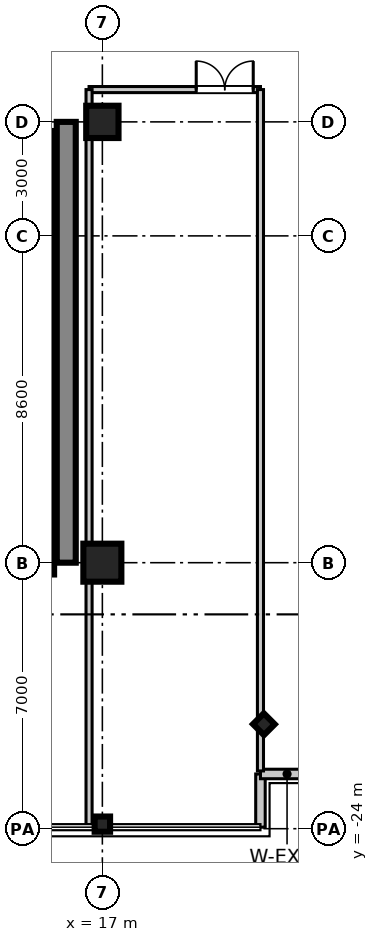
"""IFC4 building model, lengths in metres.
Left out: names, types, materials, properties, quantities, classifications, styles, units other than length and angle.
Written with IfcOpenShell. Run it as: python <this file> out.ifc"""

import sys

from ifc_helpers import new_model, si_unit, direction, frame, frame_2d, origin, origin_2d, place, context, subcontext, project, spatial, rectangle, i_section, extrude, source, transform, mapped, element, fill, save


model = new_model("IFC4")
c1 = context("Model", 3, precision=1e-05, world=origin(), true_north=direction((0.0, 1.0)))
c2 = subcontext(c1, "Body", "Model", "MODEL_VIEW")
j1 = project(units=[si_unit("LENGTHUNIT", "METRE"), si_unit("PLANEANGLEUNIT", "RADIAN")], contexts=[c1])
p1 = place(None, origin())
s1 = spatial("IfcSite", under=j1, at=p1, CompositionType="ELEMENT")
p2 = place(p1, origin())
s2 = spatial("IfcBuilding", under=s1, at=p2, CompositionType="ELEMENT")
p3 = place(p2, frame((0.0, 0.0, 234.5)))
s3 = spatial("IfcBuildingStorey", under=s2, at=p3, CompositionType="ELEMENT", Elevation=234.5)
m1 = source(origin(), c2, "Body", "SweptSolid", [
    extrude(rectangle(XDim=1.0, YDim=1.0, at=origin_2d()), origin(), (0.0, 0.0, 1.0), 3.655),
])
p4 = place(p3, frame((17.0, -17.0, 0.0), z_axis=(0.0, 0.0, 1.0), x_axis=(1.0, 0.0, 0.0)))
e1 = element("IfcColumn", 1, at=p4, inside=s3, PredefinedType="COLUMN", context=c2, shape_type="MappedRepresentation", body=[
    mapped(m1, transform((0.0, 0.0, 0.0), scale=1.0)),
])
m2 = source(origin(), c2, "Body", "SweptSolid", [
    extrude(rectangle(XDim=0.85, YDim=0.85, at=origin_2d()), origin(), (0.0, 0.0, 1.0), 3.655),
])
p5 = place(p3, frame((17.0, -5.4, 0.0), z_axis=(0.0, 0.0, 1.0), x_axis=(1.0, 0.0, 0.0)))
e2 = element("IfcColumn", 2, at=p5, inside=s3, PredefinedType="PILASTER", context=c2, shape_type="MappedRepresentation", body=[
    mapped(m2, transform((0.0, 0.0, 0.0), scale=1.0)),
])
m3 = source(origin(), c2, "Body", "SweptSolid", [
    extrude(i_section(OverallWidth=0.401, OverallDepth=0.406, WebThickness=0.016, FlangeThickness=0.025, at=origin_2d()), origin(), (0.0, 0.0, 1.0), 3.655),
])
for number, where, z_axis, x_axis in (
    (3, (17.0, -23.88, 0.0), (0.0, 0.0, 1.0), (0.0, 1.0, 0.0)),
    (4, (21.25, -21.25, 0.0), (0.0, 0.0, 1.0), (0.707, 0.707, 0.0)),
):
    element("IfcColumn", number, at=place(p3, frame(where, z_axis=z_axis, x_axis=x_axis)), inside=s3, PredefinedType="COLUMN", context=c2, shape_type="MappedRepresentation", body=[
        mapped(m3, transform((0.0, 0.0, 0.0), scale=1.0)),
    ])
m4 = source(origin(), c2, "Body", "SweptSolid", [
    extrude(rectangle(XDim=11.6, YDim=0.5, at=frame_2d((5.8, 0.0))), origin(), (0.0, 0.0, 1.0), 3.41),
])
p6 = place(p3, frame((16.05, -17.0, 0.0), z_axis=(0.0, 0.0, 1.0), x_axis=(0.0, 1.0, 0.0)))
e5 = element("IfcWall", 5, at=p6, inside=s3, PredefinedType="SHEAR", context=c2, shape_type="MappedRepresentation", body=[
    mapped(m4, transform((0.0, 0.0, 0.0), scale=1.0)),
])
m5 = source(origin(), c2, "Body", "SweptSolid", [
    extrude(rectangle(XDim=2.36, YDim=0.22, at=frame_2d((1.18, 0.0))), origin(), (0.0, 0.0, 1.0), 3.41),
])
p7 = place(p3, frame((15.62, -8.0, 0.0), z_axis=(0.0, 0.0, 1.0), x_axis=(0.0, 1.0, 0.0)))
e6 = element("IfcWall", 6, at=p7, inside=s3, PredefinedType="SHEAR", context=c2, shape_type="MappedRepresentation", body=[
    mapped(m5, transform((0.0, 0.0, 0.0), scale=1.0)),
])
m6 = source(origin(), c2, "Body", "SweptSolid", [
    extrude(rectangle(XDim=2.2, YDim=0.22, at=frame_2d((1.1, 0.0))), origin(), (0.0, 0.0, 1.0), 3.41),
])
for number, where, z_axis, x_axis in (
    (7, (15.62, -10.2, 0.0), (0.0, 0.0, 1.0), (0.0, 1.0, 0.0)),
    (8, (15.62, -12.4, 0.0), (0.0, 0.0, 1.0), (0.0, 1.0, 0.0)),
):
    element("IfcWall", number, at=place(p3, frame(where, z_axis=z_axis, x_axis=x_axis)), inside=s3, PredefinedType="SHEAR", context=c2, shape_type="MappedRepresentation", body=[
        mapped(m6, transform((0.0, 0.0, 0.0), scale=1.0)),
    ])
m7 = source(origin(), c2, "Body", "SweptSolid", [
    extrude(rectangle(XDim=2.3, YDim=0.22, at=frame_2d((1.15, 0.0))), origin(), (0.0, 0.0, 1.0), 3.41),
])
p8 = place(p3, frame((15.62, -14.7, 0.0), z_axis=(0.0, 0.0, 1.0), x_axis=(0.0, 1.0, 0.0)))
e9 = element("IfcWall", 9, at=p8, inside=s3, PredefinedType="SHEAR", context=c2, shape_type="MappedRepresentation", body=[
    mapped(m7, transform((0.0, 0.0, 0.0), scale=1.0)),
])
m8 = source(origin(), c2, "Body", "SweptSolid", [
    extrude(rectangle(XDim=2.61, YDim=0.22, at=frame_2d((1.305, 0.0))), origin(), (0.0, 0.0, 1.0), 3.41),
])
p9 = place(p3, frame((15.62, -17.31, 0.0), z_axis=(0.0, 0.0, 1.0), x_axis=(0.0, 1.0, 0.0)))
e10 = element("IfcWall", 10, at=p9, inside=s3, PredefinedType="SHEAR", context=c2, shape_type="MappedRepresentation", body=[
    mapped(m8, transform((0.0, 0.0, 0.0), scale=1.0)),
])
m9 = source(origin(), c2, "Body", "SweptSolid", [
    extrude(rectangle(XDim=1.4, YDim=0.25, at=frame_2d((0.7, 0.0))), origin(), (0.0, 0.0, 1.0), 3.41),
])
p10 = place(p3, frame((21.16, -23.96, 0.0), z_axis=(0.0, 0.0, 1.0), x_axis=(0.0, 1.0, 0.0)))
e11 = element("IfcWall", 11, at=p10, inside=s3, PredefinedType="STANDARD", context=c2, shape_type="MappedRepresentation", body=[
    mapped(m9, transform((0.0, 0.0, 0.0), scale=1.0)),
])
m10 = source(origin(), c2, "Body", "SweptSolid", [
    extrude(rectangle(XDim=1.4, YDim=0.25, at=frame_2d((0.7, 0.0))), origin(), (0.0, 0.0, 1.0), 3.41),
])
p11 = place(p3, frame((21.16, -22.56, 0.0), z_axis=(0.0, 0.0, 1.0), x_axis=(1.0, 0.0, 0.0)))
e12 = element("IfcWall", 12, at=p11, inside=s3, PredefinedType="STANDARD", context=c2, shape_type="MappedRepresentation", body=[
    mapped(m10, transform((0.0, 0.0, 0.0), scale=1.0)),
])
m11 = source(origin(), c2, "Body", "SweptSolid", [
    extrude(rectangle(XDim=4.51, YDim=0.16, at=frame_2d((2.255, 0.0))), origin(), (0.0, 0.0, 1.0), 2.75),
])
p12 = place(p3, frame((16.65, -4.55, 0.0), z_axis=(0.0, 0.0, 1.0), x_axis=(1.0, 0.0, 0.0)))
e13 = element("IfcWall", 13, at=p12, inside=s3, PredefinedType="PARTITIONING", context=c2, shape_type="MappedRepresentation", body=[
    mapped(m11, transform((0.0, 0.0, 0.0), scale=1.0)),
])
p13 = place(p12, frame((2.82, 0.0, 0.0)))
e14 = element("IfcOpeningElement", 14, at=p13, cuts=e13, PredefinedType="OPENING", context=c2, shape_type="SweptSolid", body=[
    extrude(rectangle(XDim=1.5, YDim=2.15, at=frame_2d((0.75, 1.075))), frame((0.0, 0.09, 0.0), z_axis=(0.0, -1.0, 0.0), x_axis=(1.0, 0.0, 0.0)), (0.0, 0.0, 1.0), 0.18),
])
m12 = source(origin(), c2, "Body", "SweptSolid", [
    extrude(rectangle(XDim=19.35, YDim=0.16, at=frame_2d((9.675, 0.0))), origin(), (0.0, 0.0, 1.0), 2.75),
])
p14 = place(p3, frame((16.65, -23.9, 0.0), z_axis=(0.0, 0.0, 1.0), x_axis=(0.0, 1.0, 0.0)))
e15 = element("IfcWall", 15, at=p14, inside=s3, PredefinedType="PARTITIONING", context=c2, shape_type="MappedRepresentation", body=[
    mapped(m12, transform((0.0, 0.0, 0.0), scale=1.0)),
])
m13 = source(origin(), c2, "Body", "SweptSolid", [
    extrude(rectangle(XDim=17.93, YDim=0.16, at=frame_2d((8.965, 0.0))), origin(), (0.0, 0.0, 1.0), 2.75),
])
p15 = place(p3, frame((21.16, -22.48, 0.0), z_axis=(0.0, 0.0, 1.0), x_axis=(0.0, 1.0, 0.0)))
e16 = element("IfcWall", 16, at=p15, inside=s3, PredefinedType="PARTITIONING", context=c2, shape_type="MappedRepresentation", body=[
    mapped(m13, transform((0.0, 0.0, 0.0), scale=1.0)),
])
m14 = source(origin(), c2, "Body", "SweptSolid", [
    extrude(rectangle(XDim=1.5, YDim=2.15, at=frame_2d((0.75, 1.075))), frame((0.0, 0.025, 0.0), z_axis=(0.0, -1.0, 0.0), x_axis=(1.0, 0.0, 0.0)), (0.0, 0.0, 1.0), 0.05),
])
p16 = place(p13, frame((1.5, 0.0, 0.0), z_axis=(0.0, 0.0, 1.0), x_axis=(-1.0, 0.0, 0.0)))
e17 = element("IfcDoor", 17, at=p16, inside=s3, OperationType="DOUBLE_DOOR_SINGLE_SWING", PredefinedType="DOOR", context=c2, shape_type="MappedRepresentation", body=[
    mapped(m14, transform((0.0, 0.0, 0.0), scale=1.0)),
])
fill(e14, e17)
save(model, sys.argv[1])
